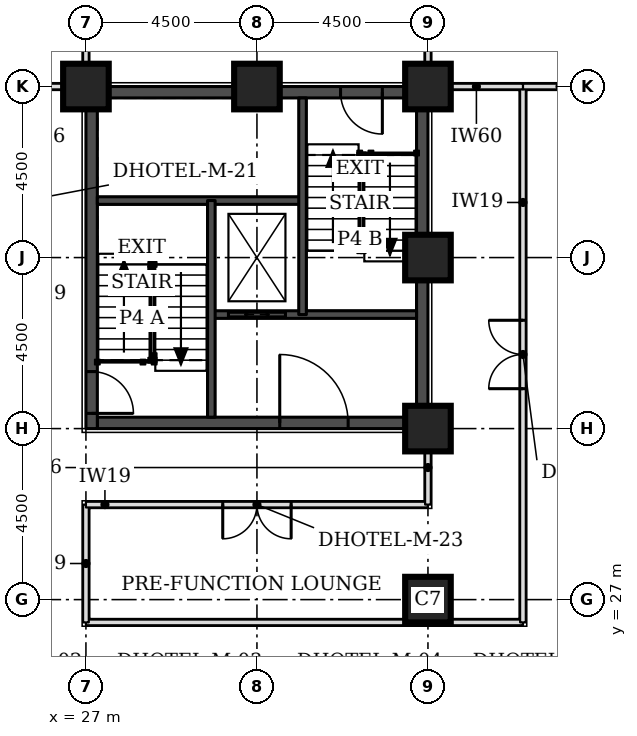
"""IFC4 building model, lengths in metres.
Left out: names, types, materials, properties, quantities, classifications, styles, units other than length and angle.
Written with IfcOpenShell. Run it as: python <this file> out.ifc"""

import sys

from ifc_helpers import new_model, si_unit, direction, frame, frame_2d, origin, origin_2d, place, context, subcontext, project, spatial, rectangle, extrude, element, fill, save


model = new_model("IFC4")
c1 = context("Model", 3, precision=1e-05, world=origin(), true_north=direction((0.0, 1.0)))
c2 = subcontext(c1, "Body", "Model", "MODEL_VIEW")
j1 = project(units=[si_unit("LENGTHUNIT", "METRE"), si_unit("PLANEANGLEUNIT", "RADIAN")], contexts=[c1])
p1 = place(None, origin())
s1 = spatial("IfcSite", under=j1, at=p1, CompositionType="ELEMENT")
p2 = place(p1, origin())
s2 = spatial("IfcBuilding", under=s1, at=p2, CompositionType="ELEMENT")
p3 = place(p2, frame((0.0, 0.0, 23.1)))
s3 = spatial("IfcBuildingStorey", under=s2, at=p3, CompositionType="ELEMENT", Elevation=23.1)
for number, where, z_axis, x_axis in (
    (1, (36.0, 27.0, 0.0), (0.0, 0.0, 1.0), (1.0, 0.0, 0.0)),
    (2, (36.0, 31.5, 0.0), (0.0, 0.0, 1.0), (1.0, 0.0, 0.0)),
    (3, (36.0, 36.0, 0.0), (0.0, 0.0, 1.0), (1.0, 0.0, 0.0)),
    (4, (27.0, 40.5, 0.0), (0.0, 0.0, 1.0), (1.0, 0.0, 0.0)),
    (5, (31.5, 40.5, 0.0), (0.0, 0.0, 1.0), (1.0, 0.0, 0.0)),
    (6, (36.0, 40.5, 0.0), (0.0, 0.0, 1.0), (1.0, 0.0, 0.0)),
):
    element("IfcColumn", number, at=place(p3, frame(where, z_axis=z_axis, x_axis=x_axis)), inside=s3, PredefinedType="COLUMN", context=c2, shape_type="SweptSolid", body=[
        extrude(rectangle(XDim=1.2, YDim=1.2, at=origin_2d()), origin(), (0.0, 0.0, 1.0), 3.3),
    ])
p4 = place(p3, frame((27.3, 31.65, 0.0), z_axis=(0.0, 0.0, 1.0), x_axis=(1.0, 0.0, 0.0)))
e7 = element("IfcWall", 7, at=p4, inside=s3, PredefinedType="SHEAR", context=c2, shape_type="SweptSolid", body=[
    extrude(rectangle(XDim=8.4, YDim=0.3, at=frame_2d((4.2, 0.0))), origin(), (0.0, 0.0, 1.0), 3.3),
])
p5 = place(p4, frame((4.8, 0.0, 0.0)))
e8 = element("IfcOpeningElement", 8, at=p5, cuts=e7, PredefinedType="OPENING", context=c2, shape_type="SweptSolid", body=[
    extrude(rectangle(XDim=1.8, YDim=2.1, at=frame_2d((0.9, 1.05))), frame((0.0, 0.16, 0.0), z_axis=(0.0, -1.0, 0.0), x_axis=(1.0, 0.0, 0.0)), (0.0, 0.0, 1.0), 0.32),
])
p6 = place(p3, frame((27.3, 40.35, 0.0), z_axis=(0.0, 0.0, 1.0), x_axis=(1.0, 0.0, 0.0)))
e9 = element("IfcWall", 9, at=p6, inside=s3, PredefinedType="SHEAR", context=c2, shape_type="SweptSolid", body=[
    extrude(rectangle(XDim=8.4, YDim=0.3, at=frame_2d((4.2, 0.0))), origin(), (0.0, 0.0, 1.0), 3.3),
])
p7 = place(p6, frame((6.4, 0.0, 0.0)))
e10 = element("IfcOpeningElement", 10, at=p7, cuts=e9, PredefinedType="OPENING", context=c2, shape_type="SweptSolid", body=[
    extrude(rectangle(XDim=1.1, YDim=2.1, at=frame_2d((0.55, 1.05))), frame((0.0, 0.16, 0.0), z_axis=(0.0, -1.0, 0.0), x_axis=(1.0, 0.0, 0.0)), (0.0, 0.0, 1.0), 0.32),
])
p8 = place(p3, frame((27.15, 31.5, 0.0), z_axis=(0.0, 0.0, 1.0), x_axis=(0.0, 1.0, 0.0)))
e11 = element("IfcWall", 11, at=p8, inside=s3, PredefinedType="SHEAR", context=c2, shape_type="SweptSolid", body=[
    extrude(rectangle(XDim=9.0, YDim=0.3, at=frame_2d((4.5, 0.0))), origin(), (0.0, 0.0, 1.0), 3.3),
])
p9 = place(p8, frame((0.4, 0.0, 0.0)))
e12 = element("IfcOpeningElement", 12, at=p9, cuts=e11, PredefinedType="OPENING", context=c2, shape_type="SweptSolid", body=[
    extrude(rectangle(XDim=1.1, YDim=2.1, at=frame_2d((0.55, 1.05))), frame((0.0, 0.16, 0.0), z_axis=(0.0, -1.0, 0.0), x_axis=(1.0, 0.0, 0.0)), (0.0, 0.0, 1.0), 0.32),
])
p10 = place(p3, frame((35.85, 31.5, 0.0), z_axis=(0.0, 0.0, 1.0), x_axis=(0.0, 1.0, 0.0)))
e13 = element("IfcWall", 13, at=p10, inside=s3, PredefinedType="SHEAR", context=c2, shape_type="SweptSolid", body=[
    extrude(rectangle(XDim=9.0, YDim=0.3, at=frame_2d((4.5, 0.0))), origin(), (0.0, 0.0, 1.0), 3.3),
])
p11 = place(p3, frame((27.0, 26.4, 0.0), z_axis=(0.0, 0.0, 1.0), x_axis=(1.0, 0.0, 0.0)))
e14 = element("IfcWall", 14, at=p11, inside=s3, PredefinedType="PARTITIONING", context=c2, shape_type="SweptSolid", body=[
    extrude(rectangle(XDim=11.5, YDim=0.15, at=frame_2d((5.75, 0.0))), origin(), (0.0, 0.0, 1.0), 3.08),
])
p12 = place(p3, frame((27.0, 26.4, 0.0), z_axis=(0.0, 0.0, 1.0), x_axis=(0.0, 1.0, 0.0)))
e15 = element("IfcWall", 15, at=p12, inside=s3, PredefinedType="PARTITIONING", context=c2, shape_type="SweptSolid", body=[
    extrude(rectangle(XDim=3.1, YDim=0.15, at=frame_2d((1.55, 0.0))), origin(), (0.0, 0.0, 1.0), 3.08),
])
p13 = place(p3, frame((38.5, 26.4, 0.0), z_axis=(0.0, 0.0, 1.0), x_axis=(0.0, 1.0, 0.0)))
e16 = element("IfcWall", 16, at=p13, inside=s3, PredefinedType="PARTITIONING", context=c2, shape_type="SweptSolid", body=[
    extrude(rectangle(XDim=14.1, YDim=0.15, at=frame_2d((7.05, 0.0))), origin(), (0.0, 0.0, 1.0), 3.08),
])
p14 = place(p13, frame((6.15, 0.0, 0.0)))
e17 = element("IfcOpeningElement", 17, at=p14, cuts=e16, PredefinedType="OPENING", context=c2, shape_type="SweptSolid", body=[
    extrude(rectangle(XDim=1.8, YDim=2.1, at=frame_2d((0.9, 1.05))), frame((0.0, 0.085, 0.0), z_axis=(0.0, -1.0, 0.0), x_axis=(1.0, 0.0, 0.0)), (0.0, 0.0, 1.0), 0.17),
])
p15 = place(p3, frame((27.0, 29.5, 0.0), z_axis=(0.0, 0.0, 1.0), x_axis=(1.0, 0.0, 0.0)))
e18 = element("IfcWall", 18, at=p15, inside=s3, PredefinedType="PARTITIONING", context=c2, shape_type="SweptSolid", body=[
    extrude(rectangle(XDim=9.0, YDim=0.15, at=frame_2d((4.5, 0.0))), origin(), (0.0, 0.0, 1.0), 3.08),
])
p16 = place(p15, frame((3.6, 0.0, 0.0)))
e19 = element("IfcOpeningElement", 19, at=p16, cuts=e18, PredefinedType="OPENING", context=c2, shape_type="SweptSolid", body=[
    extrude(rectangle(XDim=1.8, YDim=2.1, at=frame_2d((0.9, 1.05))), frame((0.0, 0.085, 0.0), z_axis=(0.0, -1.0, 0.0), x_axis=(1.0, 0.0, 0.0)), (0.0, 0.0, 1.0), 0.17),
])
p17 = place(p3, frame((36.0, 29.5, 0.0), z_axis=(0.0, 0.0, 1.0), x_axis=(0.0, 1.0, 0.0)))
e20 = element("IfcWall", 20, at=p17, inside=s3, PredefinedType="PARTITIONING", context=c2, shape_type="SweptSolid", body=[
    extrude(rectangle(XDim=1.95, YDim=0.15, at=frame_2d((0.975, 0.0))), origin(), (0.0, 0.0, 1.0), 2.33),
])
p18 = place(p3, frame((24.6, 40.5, 0.0), z_axis=(0.0, 0.0, 1.0), x_axis=(1.0, 0.0, 0.0)))
e21 = element("IfcWall", 21, at=p18, inside=s3, PredefinedType="PARTITIONING", context=c2, shape_type="SweptSolid", body=[
    extrude(rectangle(XDim=2.35, YDim=0.15, at=frame_2d((1.175, 0.0))), origin(), (0.0, 0.0, 1.0), 2.33),
])
p19 = place(p3, frame((38.5, 40.5, 0.0), z_axis=(0.0, 0.0, 1.0), x_axis=(1.0, 0.0, 0.0)))
e22 = element("IfcWall", 22, at=p19, inside=s3, PredefinedType="PARTITIONING", context=c2, shape_type="SweptSolid", body=[
    extrude(rectangle(XDim=1.95, YDim=0.15, at=frame_2d((0.975, 0.0))), origin(), (0.0, 0.0, 1.0), 2.33),
])
p20 = place(p3, frame((27.0, 40.55, 0.0), z_axis=(0.0, 0.0, 1.0), x_axis=(0.0, 1.0, 0.0)))
e23 = element("IfcWall", 23, at=p20, inside=s3, PredefinedType="PARTITIONING", context=c2, shape_type="SweptSolid", body=[
    extrude(rectangle(XDim=2.45, YDim=0.15, at=frame_2d((1.225, 0.0))), origin(), (0.0, 0.0, 1.0), 3.08),
])
p21 = place(p3, frame((36.0, 40.55, 0.0), z_axis=(0.0, 0.0, 1.0), x_axis=(0.0, 1.0, 0.0)))
e24 = element("IfcWall", 24, at=p21, inside=s3, PredefinedType="PARTITIONING", context=c2, shape_type="SweptSolid", body=[
    extrude(rectangle(XDim=4.4, YDim=0.15, at=frame_2d((2.2, 0.0))), origin(), (0.0, 0.0, 1.0), 2.33),
])
p22 = place(p21, frame((1.302, 0.0, 0.0)))
e25 = element("IfcOpeningElement", 25, at=p22, cuts=e24, PredefinedType="OPENING", context=c2, shape_type="SweptSolid", body=[
    extrude(rectangle(XDim=1.8, YDim=2.1, at=frame_2d((0.9, 1.05))), frame((0.0, 0.085, 0.0), z_axis=(0.0, -1.0, 0.0), x_axis=(1.0, 0.0, 0.0)), (0.0, 0.0, 1.0), 0.17),
])
p23 = place(p3, frame((36.05, 40.5, 0.0), z_axis=(0.0, 0.0, 1.0), x_axis=(1.0, 0.0, 0.0)))
e26 = element("IfcWall", 26, at=p23, inside=s3, PredefinedType="PARTITIONING", context=c2, shape_type="SweptSolid", body=[
    extrude(rectangle(XDim=2.45, YDim=0.15, at=frame_2d((1.225, 0.0))), origin(), (0.0, 0.0, 1.0), 2.33),
])
p24 = place(p3, frame((30.3, 34.5, 0.0), z_axis=(0.0, 0.0, 1.0), x_axis=(1.0, 0.0, 0.0)))
e27 = element("IfcWall", 27, at=p24, inside=s3, PredefinedType="SOLIDWALL", context=c2, shape_type="SweptSolid", body=[
    extrude(rectangle(XDim=5.4, YDim=0.2, at=frame_2d((2.7, 0.0))), origin(), (0.0, 0.0, 1.0), 3.08),
])
p25 = place(p24, frame((0.45, 0.0, 0.0)))
e28 = element("IfcOpeningElement", 28, at=p25, cuts=e27, PredefinedType="OPENING", context=c2, shape_type="SweptSolid", body=[
    extrude(rectangle(XDim=1.5, YDim=2.1, at=frame_2d((0.75, 1.05))), frame((0.0, 0.11, 0.0), z_axis=(0.0, -1.0, 0.0), x_axis=(1.0, 0.0, 0.0)), (0.0, 0.0, 1.0), 0.22),
])
p26 = place(p3, frame((27.3, 37.5, 0.0), z_axis=(0.0, 0.0, 1.0), x_axis=(1.0, 0.0, 0.0)))
e29 = element("IfcWall", 29, at=p26, inside=s3, PredefinedType="SOLIDWALL", context=c2, shape_type="SweptSolid", body=[
    extrude(rectangle(XDim=5.4, YDim=0.2, at=frame_2d((2.7, 0.0))), origin(), (0.0, 0.0, 1.0), 3.08),
])
for number, where, z_axis, x_axis in (
    (30, (30.3, 31.8, 0.0), (0.0, 0.0, 1.0), (0.0, 1.0, 0.0)),
    (31, (32.7, 34.5, 0.0), (0.0, 0.0, 1.0), (0.0, 1.0, 0.0)),
):
    element("IfcWall", number, at=place(p3, frame(where, z_axis=z_axis, x_axis=x_axis)), inside=s3, PredefinedType="SOLIDWALL", context=c2, shape_type="SweptSolid", body=[
        extrude(rectangle(XDim=5.7, YDim=0.2, at=frame_2d((2.85, 0.0))), origin(), (0.0, 0.0, 1.0), 3.08),
    ])
p27 = place(p14, origin())
e32 = element("IfcDoor", 32, at=p27, inside=s3, OperationType="DOUBLE_DOOR_SINGLE_SWING", PredefinedType="DOOR", context=c2, shape_type="SweptSolid", body=[
    extrude(rectangle(XDim=1.8, YDim=2.1, at=frame_2d((0.9, 1.05))), frame((0.0, 0.025, 0.0), z_axis=(0.0, -1.0, 0.0), x_axis=(1.0, 0.0, 0.0)), (0.0, 0.0, 1.0), 0.05),
])
fill(e17, e32)
p28 = place(p16, frame((1.8, 0.0, 0.0), z_axis=(0.0, 0.0, 1.0), x_axis=(-1.0, 0.0, 0.0)))
e33 = element("IfcDoor", 33, at=p28, inside=s3, OperationType="DOUBLE_DOOR_SINGLE_SWING", PredefinedType="DOOR", context=c2, shape_type="SweptSolid", body=[
    extrude(rectangle(XDim=1.8, YDim=2.1, at=frame_2d((0.9, 1.05))), frame((0.0, 0.025, 0.0), z_axis=(0.0, -1.0, 0.0), x_axis=(1.0, 0.0, 0.0)), (0.0, 0.0, 1.0), 0.05),
])
fill(e19, e33)
p29 = place(p9, frame((1.1, 0.0, 0.0), z_axis=(0.0, 0.0, 1.0), x_axis=(-1.0, 0.0, 0.0)))
e34 = element("IfcDoor", 34, at=p29, inside=s3, OperationType="SINGLE_SWING_RIGHT", PredefinedType="DOOR", context=c2, shape_type="SweptSolid", body=[
    extrude(rectangle(XDim=1.1, YDim=2.1, at=frame_2d((0.55, 1.05))), frame((0.0, 0.025, 0.0), z_axis=(0.0, -1.0, 0.0), x_axis=(1.0, 0.0, 0.0)), (0.0, 0.0, 1.0), 0.05),
])
fill(e12, e34)
p30 = place(p7, frame((1.1, 0.0, 0.0), z_axis=(0.0, 0.0, 1.0), x_axis=(-1.0, 0.0, 0.0)))
e35 = element("IfcDoor", 35, at=p30, inside=s3, OperationType="SINGLE_SWING_LEFT", PredefinedType="DOOR", context=c2, shape_type="SweptSolid", body=[
    extrude(rectangle(XDim=1.1, YDim=2.1, at=frame_2d((0.55, 1.05))), frame((0.0, 0.025, 0.0), z_axis=(0.0, -1.0, 0.0), x_axis=(1.0, 0.0, 0.0)), (0.0, 0.0, 1.0), 0.05),
])
fill(e10, e35)
p31 = place(p25, origin())
e36 = element("IfcDoor", 36, at=p31, inside=s3, OperationType="DOUBLE_DOOR_SLIDING", PredefinedType="DOOR", context=c2, shape_type="SweptSolid", body=[
    extrude(rectangle(XDim=1.5, YDim=2.1, at=frame_2d((0.75, 1.05))), frame((0.0, 0.025, 0.0), z_axis=(0.0, -1.0, 0.0), x_axis=(1.0, 0.0, 0.0)), (0.0, 0.0, 1.0), 0.05),
])
fill(e28, e36)
p32 = place(p5, origin())
e37 = element("IfcDoor", 37, at=p32, inside=s3, OperationType="SINGLE_SWING_LEFT", PredefinedType="DOOR", context=c2, shape_type="SweptSolid", body=[
    extrude(rectangle(XDim=1.8, YDim=2.1, at=frame_2d((0.9, 1.05))), frame((0.0, 0.025, 0.0), z_axis=(0.0, -1.0, 0.0), x_axis=(1.0, 0.0, 0.0)), (0.0, 0.0, 1.0), 0.05),
])
fill(e8, e37)
save(model, sys.argv[1])
